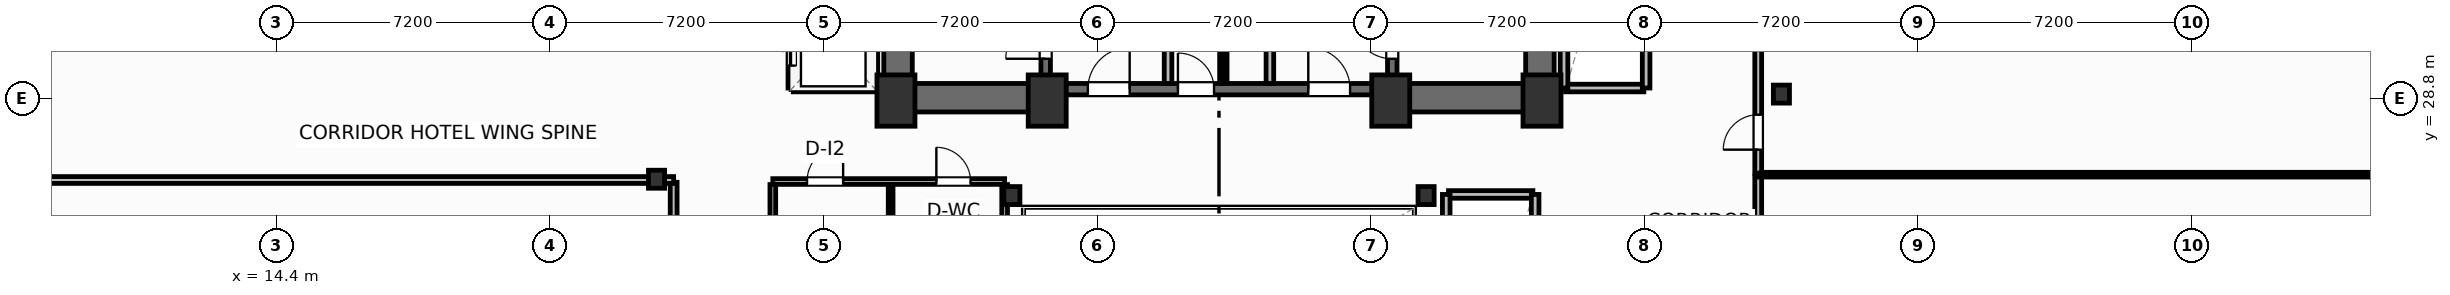
"""IFC4 building model, lengths in metres.
Left out: names, types, materials, properties, quantities, classifications, styles, units other than length and angle.
Written with IfcOpenShell. Run it as: python <this file> out.ifc"""

import sys

from ifc_helpers import new_model, si_unit, direction, frame, frame_2d, origin, origin_2d, place, context, subcontext, project, spatial, rectangle, i_section, extrude, element, fill, save


model = new_model("IFC4")
c1 = context("Model", 3, precision=1e-05, world=origin(), true_north=direction((0.0, 1.0)))
c2 = subcontext(c1, "Body", "Model", "MODEL_VIEW")
j1 = project(units=[si_unit("LENGTHUNIT", "METRE"), si_unit("PLANEANGLEUNIT", "RADIAN")], contexts=[c1])
p1 = place(None, origin())
s1 = spatial("IfcSite", under=j1, at=p1, CompositionType="ELEMENT")
p2 = place(p1, origin())
s2 = spatial("IfcBuilding", under=s1, at=p2, CompositionType="ELEMENT")
p3 = place(p2, frame((0.0, 0.0, 76.2)))
s3 = spatial("IfcBuildingStorey", under=s2, at=p3, CompositionType="ELEMENT", Elevation=76.2)
for number, where, z_axis, x_axis in (
    (1, (30.7, 28.75, 0.0), (0.0, 0.0, 1.0), (1.0, 0.0, 0.0)),
    (2, (34.68, 28.75, 0.0), (0.0, 0.0, 1.0), (1.0, 0.0, 0.0)),
    (3, (43.72, 28.75, 0.0), (0.0, 0.0, 1.0), (1.0, 0.0, 0.0)),
    (4, (47.7, 28.75, 0.0), (0.0, 0.0, 1.0), (1.0, 0.0, 0.0)),
):
    element("IfcColumn", number, at=place(p3, frame(where, z_axis=z_axis, x_axis=x_axis)), inside=s3, PredefinedType="COLUMN", context=c2, shape_type="SweptSolid", body=[
        extrude(rectangle(XDim=1.0, YDim=1.35, at=origin_2d()), origin(), (0.0, 0.0, 1.0), 3.7),
    ])
for number, where, z_axis, x_axis in (
    (5, (33.75, 26.25, 0.0), (0.0, 0.0, 1.0), (1.0, 0.0, 0.0)),
    (6, (44.65, 26.25, 0.0), (0.0, 0.0, 1.0), (1.0, 0.0, 0.0)),
    (7, (24.4, 26.68, 0.0), (0.0, 0.0, 1.0), (1.0, 0.0, 0.0)),
    (8, (54.0, 28.92, 0.0), (0.0, 0.0, 1.0), (1.0, 0.0, 0.0)),
):
    element("IfcColumn", number, at=place(p3, frame(where, z_axis=z_axis, x_axis=x_axis)), inside=s3, PredefinedType="COLUMN", context=c2, shape_type="SweptSolid", body=[
        extrude(i_section(OverallWidth=0.424, OverallDepth=0.474, WebThickness=0.048, FlangeThickness=0.077, FilletRadius=0.025, at=origin_2d()), origin(), (0.0, 0.0, 1.0), 3.7),
    ])
for number, where, z_axis, x_axis in (
    (9, (30.755, 29.2, 0.0), (0.0, 0.0, 1.0), (0.0, 1.0, 0.0)),
    (10, (47.645, 29.2, 0.0), (0.0, 0.0, 1.0), (0.0, 1.0, 0.0)),
):
    element("IfcWall", number, at=place(p3, frame(where, z_axis=z_axis, x_axis=x_axis)), inside=s3, PredefinedType="SHEAR", context=c2, shape_type="SweptSolid", body=[
        extrude(rectangle(XDim=9.22, YDim=0.75, at=frame_2d((4.61, 0.0))), origin(), (0.0, 0.0, 1.0), 3.45),
    ])
p4 = place(p3, frame((30.38, 28.825, 0.0), z_axis=(0.0, 0.0, 1.0), x_axis=(1.0, 0.0, 0.0)))
e11 = element("IfcWall", 11, at=p4, inside=s3, PredefinedType="SHEAR", context=c2, shape_type="SweptSolid", body=[
    extrude(rectangle(XDim=4.42, YDim=0.75, at=frame_2d((2.21, 0.0))), origin(), (0.0, 0.0, 1.0), 3.45),
])
p5 = place(p3, frame((43.6, 28.825, 0.0), z_axis=(0.0, 0.0, 1.0), x_axis=(1.0, 0.0, 0.0)))
e12 = element("IfcWall", 12, at=p5, inside=s3, PredefinedType="SHEAR", context=c2, shape_type="SweptSolid", body=[
    extrude(rectangle(XDim=4.42, YDim=0.75, at=frame_2d((2.21, 0.0))), origin(), (0.0, 0.0, 1.0), 3.45),
])
p6 = place(p3, frame((34.8, 29.05, 0.0), z_axis=(0.0, 0.0, 1.0), x_axis=(1.0, 0.0, 0.0)))
e13 = element("IfcWall", 13, at=p6, inside=s3, PredefinedType="SHEAR", context=c2, shape_type="SweptSolid", body=[
    extrude(rectangle(XDim=8.8, YDim=0.3, at=frame_2d((4.4, 0.0))), origin(), (0.0, 0.0, 1.0), 3.45),
])
p7 = place(p6, frame((0.95, 0.0, 0.0)))
e14 = element("IfcOpeningElement", 14, at=p7, cuts=e13, PredefinedType="OPENING", context=c2, shape_type="SweptSolid", body=[
    extrude(rectangle(XDim=1.1, YDim=2.15, at=frame_2d((0.55, 1.075))), frame((0.0, 0.16, 0.0), z_axis=(0.0, -1.0, 0.0), x_axis=(1.0, 0.0, 0.0)), (0.0, 0.0, 1.0), 0.32),
])
p8 = place(p6, frame((6.75, 0.0, 0.0)))
e15 = element("IfcOpeningElement", 15, at=p8, cuts=e13, PredefinedType="OPENING", context=c2, shape_type="SweptSolid", body=[
    extrude(rectangle(XDim=1.1, YDim=2.15, at=frame_2d((0.55, 1.075))), frame((0.0, 0.16, 0.0), z_axis=(0.0, -1.0, 0.0), x_axis=(1.0, 0.0, 0.0)), (0.0, 0.0, 1.0), 0.32),
])
p9 = place(p6, frame((3.32, 0.0, 0.0)))
e16 = element("IfcOpeningElement", 16, at=p9, cuts=e13, PredefinedType="OPENING", context=c2, shape_type="SweptSolid", body=[
    extrude(rectangle(XDim=0.95, YDim=2.15, at=frame_2d((0.475, 1.075))), frame((0.0, 0.16, 0.0), z_axis=(0.0, -1.0, 0.0), x_axis=(1.0, 0.0, 0.0)), (0.0, 0.0, 1.0), 0.32),
])
p10 = place(p3, frame((34.64, 29.2, 0.0), z_axis=(0.0, 0.0, 1.0), x_axis=(0.0, 1.0, 0.0)))
e17 = element("IfcWall", 17, at=p10, inside=s3, PredefinedType="SHEAR", context=c2, shape_type="SweptSolid", body=[
    extrude(rectangle(XDim=9.22, YDim=0.25, at=frame_2d((4.61, 0.0))), origin(), (0.0, 0.0, 1.0), 3.45),
])
p11 = place(p10, frame((0.65, 0.0, 0.0)))
e18 = element("IfcOpeningElement", 18, at=p11, cuts=e17, PredefinedType="OPENING", context=c2, shape_type="SweptSolid", body=[
    extrude(rectangle(XDim=1.05, YDim=2.15, at=frame_2d((0.525, 1.075))), frame((0.0, 0.135, 0.0), z_axis=(0.0, -1.0, 0.0), x_axis=(1.0, 0.0, 0.0)), (0.0, 0.0, 1.0), 0.27),
])
p12 = place(p3, frame((43.76, 29.2, 0.0), z_axis=(0.0, 0.0, 1.0), x_axis=(0.0, 1.0, 0.0)))
e19 = element("IfcWall", 19, at=p12, inside=s3, PredefinedType="SHEAR", context=c2, shape_type="SweptSolid", body=[
    extrude(rectangle(XDim=9.22, YDim=0.25, at=frame_2d((4.61, 0.0))), origin(), (0.0, 0.0, 1.0), 3.45),
])
p13 = place(p12, frame((0.65, 0.0, 0.0)))
e20 = element("IfcOpeningElement", 20, at=p13, cuts=e19, PredefinedType="OPENING", context=c2, shape_type="SweptSolid", body=[
    extrude(rectangle(XDim=1.05, YDim=2.15, at=frame_2d((0.525, 1.075))), frame((0.0, 0.135, 0.0), z_axis=(0.0, -1.0, 0.0), x_axis=(1.0, 0.0, 0.0)), (0.0, 0.0, 1.0), 0.27),
])
p14 = place(p3, frame((24.85, 23.03, 0.0), z_axis=(0.0, 0.0, 1.0), x_axis=(0.0, 1.0, 0.0)))
e21 = element("IfcWall", 21, at=p14, inside=s3, PredefinedType="PARTITIONING", context=c2, shape_type="SweptSolid", body=[
    extrude(rectangle(XDim=3.57, YDim=0.18, at=frame_2d((1.785, 0.0))), origin(), (0.0, 0.0, 1.0), 3.45),
])
p15 = place(p14, frame((1.5, 0.0, 0.0)))
e22 = element("IfcOpeningElement", 22, at=p15, cuts=e21, PredefinedType="OPENING", context=c2, shape_type="SweptSolid", body=[
    extrude(rectangle(XDim=0.92, YDim=2.05, at=frame_2d((0.46, 1.025))), frame((0.0, 0.1, 0.0), z_axis=(0.0, -1.0, 0.0), x_axis=(1.0, 0.0, 0.0)), (0.0, 0.0, 1.0), 0.2),
])
p16 = place(p3, frame((-0.086, 26.66, 0.0), z_axis=(0.0, 0.0, 1.0), x_axis=(1.0, 0.0, 0.0)))
e23 = element("IfcWall", 23, at=p16, inside=s3, PredefinedType="PARTITIONING", context=c2, shape_type="SweptSolid", body=[
    extrude(rectangle(XDim=24.936, YDim=0.18, at=frame_2d((12.468, 0.0))), origin(), (0.0, 0.0, 1.0), 2.662),
])
p17 = place(p3, frame((53.39, 19.24, 0.0), z_axis=(0.0, 0.0, 1.0), x_axis=(0.0, 1.0, 0.0)))
e24 = element("IfcWall", 24, at=p17, inside=s3, PredefinedType="PARTITIONING", context=c2, shape_type="SweptSolid", body=[
    extrude(rectangle(XDim=7.52, YDim=0.18, at=frame_2d((3.76, 0.0))), origin(), (0.0, 0.0, 1.0), 3.45),
])
p18 = place(p17, frame((2.1, 0.0, 0.0)))
e25 = element("IfcOpeningElement", 25, at=p18, cuts=e24, PredefinedType="OPENING", context=c2, shape_type="SweptSolid", body=[
    extrude(rectangle(XDim=0.92, YDim=2.05, at=frame_2d((0.46, 1.025))), frame((0.0, 0.1, 0.0), z_axis=(0.0, -1.0, 0.0), x_axis=(1.0, 0.0, 0.0)), (0.0, 0.0, 1.0), 0.2),
])
p19 = place(p3, frame((53.39, 26.8, 0.0), z_axis=(0.0, 0.0, 1.0), x_axis=(1.0, 0.0, 0.0)))
e26 = element("IfcWall", 26, at=p19, inside=s3, PredefinedType="PARTITIONING", context=c2, shape_type="SweptSolid", body=[
    extrude(rectangle(XDim=23.61, YDim=0.125, at=frame_2d((11.805, 0.0))), origin(), (0.0, 0.0, 1.0), 3.45),
])
p20 = place(p3, frame((53.39, 26.84, 0.0), z_axis=(0.0, 0.0, 1.0), x_axis=(0.0, 1.0, 0.0)))
e27 = element("IfcWall", 27, at=p20, inside=s3, PredefinedType="PARTITIONING", context=c2, shape_type="SweptSolid", body=[
    extrude(rectangle(XDim=12.46, YDim=0.18, at=frame_2d((6.23, 0.0))), origin(), (0.0, 0.0, 1.0), 3.45),
])
p21 = place(p20, frame((0.618, 0.0, 0.0)))
e28 = element("IfcOpeningElement", 28, at=p21, cuts=e27, PredefinedType="OPENING", context=c2, shape_type="SweptSolid", body=[
    extrude(rectangle(XDim=0.92, YDim=2.05, at=frame_2d((0.46, 1.025))), frame((0.0, 0.1, 0.0), z_axis=(0.0, -1.0, 0.0), x_axis=(1.0, 0.0, 0.0)), (0.0, 0.0, 1.0), 0.2),
])
for number, where, z_axis, x_axis in (
    (29, (37.86, 29.2, 0.0), (0.0, 0.0, 1.0), (0.0, 1.0, 0.0)),
    (30, (40.54, 29.2, 0.0), (0.0, 0.0, 1.0), (0.0, 1.0, 0.0)),
):
    element("IfcWall", number, at=place(p3, frame(where, z_axis=z_axis, x_axis=x_axis)), inside=s3, PredefinedType="PARTITIONING", context=c2, shape_type="SweptSolid", body=[
        extrude(rectangle(XDim=5.18, YDim=0.2, at=frame_2d((2.59, 0.0))), origin(), (0.0, 0.0, 1.0), 3.45),
    ])
p22 = place(p3, frame((39.35, 29.2, 0.0), z_axis=(0.0, 0.0, 1.0), x_axis=(0.0, 1.0, 0.0)))
e31 = element("IfcWall", 31, at=p22, inside=s3, PredefinedType="PARTITIONING", context=c2, shape_type="SweptSolid", body=[
    extrude(rectangle(XDim=5.22, YDim=0.125, at=frame_2d((2.61, 0.0))), origin(), (0.0, 0.0, 1.0), 3.45),
])
p23 = place(p22, frame((2.05, 0.0, 0.0)))
e32 = element("IfcOpeningElement", 32, at=p23, cuts=e31, PredefinedType="OPENING", context=c2, shape_type="SweptSolid", body=[
    extrude(rectangle(XDim=0.85, YDim=2.05, at=frame_2d((0.425, 1.025))), frame((0.0, 0.073, 0.0), z_axis=(0.0, -1.0, 0.0), x_axis=(1.0, 0.0, 0.0)), (0.0, 0.0, 1.0), 0.145),
])
p24 = place(p3, frame((27.46, 26.62, 0.0), z_axis=(0.0, 0.0, 1.0), x_axis=(1.0, 0.0, 0.0)))
e33 = element("IfcWall", 33, at=p24, inside=s3, PredefinedType="PARTITIONING", context=c2, shape_type="SweptSolid", body=[
    extrude(rectangle(XDim=6.1, YDim=0.15, at=frame_2d((3.05, 0.0))), origin(), (0.0, 0.0, 1.0), 2.662),
])
p25 = place(p24, frame((0.9, 0.0, 0.0)))
e34 = element("IfcOpeningElement", 34, at=p25, cuts=e33, PredefinedType="OPENING", context=c2, shape_type="SweptSolid", body=[
    extrude(rectangle(XDim=0.95, YDim=2.05, at=frame_2d((0.475, 1.025))), frame((0.0, 0.085, 0.0), z_axis=(0.0, -1.0, 0.0), x_axis=(1.0, 0.0, 0.0)), (0.0, 0.0, 1.0), 0.17),
])
p26 = place(p24, frame((4.303, 0.0, 0.0)))
e35 = element("IfcOpeningElement", 35, at=p26, cuts=e33, PredefinedType="OPENING", context=c2, shape_type="SweptSolid", body=[
    extrude(rectangle(XDim=0.9, YDim=2.05, at=frame_2d((0.45, 1.025))), frame((0.0, 0.085, 0.0), z_axis=(0.0, -1.0, 0.0), x_axis=(1.0, 0.0, 0.0)), (0.0, 0.0, 1.0), 0.17),
])
p27 = place(p3, frame((30.56, 19.38, 0.0), z_axis=(0.0, 0.0, 1.0), x_axis=(0.0, 1.0, 0.0)))
e36 = element("IfcWall", 36, at=p27, inside=s3, PredefinedType="PARTITIONING", context=c2, shape_type="SweptSolid", body=[
    extrude(rectangle(XDim=7.16, YDim=0.125, at=frame_2d((3.58, 0.0))), origin(), (0.0, 0.0, 1.0), 3.45),
])
p28 = place(p27, frame((1.4, 0.0, 0.0)))
e37 = element("IfcOpeningElement", 37, at=p28, cuts=e36, PredefinedType="OPENING", context=c2, shape_type="SweptSolid", body=[
    extrude(rectangle(XDim=0.92, YDim=2.05, at=frame_2d((0.46, 1.025))), frame((0.0, 0.073, 0.0), z_axis=(0.0, -1.0, 0.0), x_axis=(1.0, 0.0, 0.0)), (0.0, 0.0, 1.0), 0.145),
])
p29 = place(p3, frame((27.46, 19.38, 0.0), z_axis=(0.0, 0.0, 1.0), x_axis=(0.0, 1.0, 0.0)))
e38 = element("IfcWall", 38, at=p29, inside=s3, PredefinedType="PARTITIONING", context=c2, shape_type="SweptSolid", body=[
    extrude(rectangle(XDim=7.16, YDim=0.15, at=frame_2d((3.58, 0.0))), origin(), (0.0, 0.0, 1.0), 3.45),
])
p30 = place(p3, frame((33.56, 19.38, 0.0), z_axis=(0.0, 0.0, 1.0), x_axis=(0.0, 1.0, 0.0)))
e39 = element("IfcWall", 39, at=p30, inside=s3, PredefinedType="PARTITIONING", context=c2, shape_type="SweptSolid", body=[
    extrude(rectangle(XDim=7.16, YDim=0.15, at=frame_2d((3.58, 0.0))), origin(), (0.0, 0.0, 1.0), 2.824),
])
p31 = place(p3, frame((28.0, 29.08, 0.0), z_axis=(0.0, 0.0, 1.0), x_axis=(1.0, 0.0, 0.0)))
e40 = element("IfcWall", 40, at=p31, inside=s3, PredefinedType="PARTITIONING", context=c2, shape_type="SweptSolid", body=[
    extrude(rectangle(XDim=2.1, YDim=0.2, at=frame_2d((1.05, 0.0))), origin(), (0.0, 0.0, 1.0), 3.45),
])
p32 = place(p3, frame((30.12, 29.08, 0.0), z_axis=(0.0, 0.0, 1.0), x_axis=(0.0, 1.0, 0.0)))
e41 = element("IfcWall", 41, at=p32, inside=s3, PredefinedType="PARTITIONING", context=c2, shape_type="SweptSolid", body=[
    extrude(rectangle(XDim=6.89, YDim=0.2, at=frame_2d((3.445, 0.0))), origin(), (0.0, 0.0, 1.0), 3.45),
])
p33 = place(p3, frame((27.96, 29.08, 0.0), z_axis=(0.0, 0.0, 1.0), x_axis=(0.0, 1.0, 0.0)))
e42 = element("IfcWall", 42, at=p33, inside=s3, PredefinedType="PARTITIONING", context=c2, shape_type="SweptSolid", body=[
    extrude(rectangle(XDim=6.89, YDim=0.2, at=frame_2d((3.445, 0.0))), origin(), (0.0, 0.0, 1.0), 3.45),
])
p34 = place(p33, frame((0.59, 0.0, 0.0)))
e43 = element("IfcOpeningElement", 43, at=p34, cuts=e42, PredefinedType="OPENING", context=c2, shape_type="SweptSolid", body=[
    extrude(rectangle(XDim=1.1, YDim=2.15, at=frame_2d((0.55, 1.075))), frame((0.0, 0.11, 0.0), z_axis=(0.0, -1.0, 0.0), x_axis=(1.0, 0.0, 0.0)), (0.0, 0.0, 1.0), 0.22),
])
p35 = place(p33, frame((2.89, 0.0, 0.0)))
e44 = element("IfcOpeningElement", 44, at=p35, cuts=e42, PredefinedType="OPENING", context=c2, shape_type="SweptSolid", body=[
    extrude(rectangle(XDim=1.1, YDim=2.15, at=frame_2d((0.55, 1.075))), frame((0.0, 0.11, 0.0), z_axis=(0.0, -1.0, 0.0), x_axis=(1.0, 0.0, 0.0)), (0.0, 0.0, 1.0), 0.22),
])
p36 = place(p33, frame((5.19, 0.0, 0.0)))
e45 = element("IfcOpeningElement", 45, at=p36, cuts=e42, PredefinedType="OPENING", context=c2, shape_type="SweptSolid", body=[
    extrude(rectangle(XDim=1.1, YDim=2.15, at=frame_2d((0.55, 1.075))), frame((0.0, 0.11, 0.0), z_axis=(0.0, -1.0, 0.0), x_axis=(1.0, 0.0, 0.0)), (0.0, 0.0, 1.0), 0.22),
])
p37 = place(p3, frame((48.32, 29.08, 0.0), z_axis=(0.0, 0.0, 1.0), x_axis=(1.0, 0.0, 0.0)))
e46 = element("IfcWall", 46, at=p37, inside=s3, PredefinedType="PARTITIONING", context=c2, shape_type="SweptSolid", body=[
    extrude(rectangle(XDim=2.06, YDim=0.2, at=frame_2d((1.03, 0.0))), origin(), (0.0, 0.0, 1.0), 2.662),
])
for number, where, z_axis, x_axis in (
    (47, (48.28, 29.08, 0.0), (0.0, 0.0, 1.0), (0.0, 1.0, 0.0)),
    (48, (50.44, 29.08, 0.0), (0.0, 0.0, 1.0), (0.0, 1.0, 0.0)),
):
    element("IfcWall", number, at=place(p3, frame(where, z_axis=z_axis, x_axis=x_axis)), inside=s3, PredefinedType="PARTITIONING", context=c2, shape_type="SweptSolid", body=[
        extrude(rectangle(XDim=6.89, YDim=0.2, at=frame_2d((3.445, 0.0))), origin(), (0.0, 0.0, 1.0), 3.45),
    ])
p38 = place(p3, frame((45.24, 26.28, 0.0), z_axis=(0.0, 0.0, 1.0), x_axis=(1.0, 0.0, 0.0)))
e49 = element("IfcWall", 49, at=p38, inside=s3, PredefinedType="PARTITIONING", context=c2, shape_type="SweptSolid", body=[
    extrude(rectangle(XDim=2.22, YDim=0.2, at=frame_2d((1.11, 0.0))), origin(), (0.0, 0.0, 1.0), 3.45),
])
for number, where, z_axis, x_axis in (
    (50, (45.18, 19.38, 0.0), (0.0, 0.0, 1.0), (0.0, 1.0, 0.0)),
    (51, (47.52, 19.38, 0.0), (0.0, 0.0, 1.0), (0.0, 1.0, 0.0)),
):
    element("IfcWall", number, at=place(p3, frame(where, z_axis=z_axis, x_axis=x_axis)), inside=s3, PredefinedType="PARTITIONING", context=c2, shape_type="SweptSolid", body=[
        extrude(rectangle(XDim=6.9, YDim=0.2, at=frame_2d((3.45, 0.0))), origin(), (0.0, 0.0, 1.0), 3.45),
    ])
p39 = place(p21, origin())
e52 = element("IfcDoor", 52, at=p39, inside=s3, OperationType="SINGLE_SWING_LEFT", PredefinedType="DOOR", context=c2, shape_type="SweptSolid", body=[
    extrude(rectangle(XDim=0.92, YDim=2.05, at=frame_2d((0.46, 1.025))), frame((0.0, 0.025, 0.0), z_axis=(0.0, -1.0, 0.0), x_axis=(1.0, 0.0, 0.0)), (0.0, 0.0, 1.0), 0.05),
])
fill(e28, e52)
p40 = place(p11, origin())
e53 = element("IfcDoor", 53, at=p40, inside=s3, OperationType="SINGLE_SWING_LEFT", PredefinedType="DOOR", context=c2, shape_type="SweptSolid", body=[
    extrude(rectangle(XDim=1.05, YDim=2.15, at=frame_2d((0.525, 1.075))), frame((0.0, 0.025, 0.0), z_axis=(0.0, -1.0, 0.0), x_axis=(1.0, 0.0, 0.0)), (0.0, 0.0, 1.0), 0.05),
])
fill(e18, e53)
p41 = place(p13, origin())
e54 = element("IfcDoor", 54, at=p41, inside=s3, OperationType="SINGLE_SWING_RIGHT", PredefinedType="DOOR", context=c2, shape_type="SweptSolid", body=[
    extrude(rectangle(XDim=1.05, YDim=2.15, at=frame_2d((0.525, 1.075))), frame((0.0, 0.025, 0.0), z_axis=(0.0, -1.0, 0.0), x_axis=(1.0, 0.0, 0.0)), (0.0, 0.0, 1.0), 0.05),
])
fill(e20, e54)
p42 = place(p7, origin())
e55 = element("IfcDoor", 55, at=p42, inside=s3, OperationType="SINGLE_SWING_RIGHT", PredefinedType="DOOR", context=c2, shape_type="SweptSolid", body=[
    extrude(rectangle(XDim=1.1, YDim=2.15, at=frame_2d((0.55, 1.075))), frame((0.0, 0.025, 0.0), z_axis=(0.0, -1.0, 0.0), x_axis=(1.0, 0.0, 0.0)), (0.0, 0.0, 1.0), 0.05),
])
fill(e14, e55)
p43 = place(p8, origin())
e56 = element("IfcDoor", 56, at=p43, inside=s3, OperationType="SINGLE_SWING_LEFT", PredefinedType="DOOR", context=c2, shape_type="SweptSolid", body=[
    extrude(rectangle(XDim=1.1, YDim=2.15, at=frame_2d((0.55, 1.075))), frame((0.0, 0.025, 0.0), z_axis=(0.0, -1.0, 0.0), x_axis=(1.0, 0.0, 0.0)), (0.0, 0.0, 1.0), 0.05),
])
fill(e15, e56)
p44 = place(p9, origin())
e57 = element("IfcDoor", 57, at=p44, inside=s3, OperationType="SINGLE_SWING_LEFT", PredefinedType="DOOR", context=c2, shape_type="SweptSolid", body=[
    extrude(rectangle(XDim=0.95, YDim=2.15, at=frame_2d((0.475, 1.075))), frame((0.0, 0.025, 0.0), z_axis=(0.0, -1.0, 0.0), x_axis=(1.0, 0.0, 0.0)), (0.0, 0.0, 1.0), 0.05),
])
fill(e16, e57)
p45 = place(p25, origin())
e58 = element("IfcDoor", 58, at=p45, inside=s3, OperationType="SINGLE_SWING_RIGHT", PredefinedType="DOOR", context=c2, shape_type="SweptSolid", body=[
    extrude(rectangle(XDim=0.95, YDim=2.05, at=frame_2d((0.475, 1.025))), frame((0.0, 0.025, 0.0), z_axis=(0.0, -1.0, 0.0), x_axis=(1.0, 0.0, 0.0)), (0.0, 0.0, 1.0), 0.05),
])
fill(e34, e58)
p46 = place(p26, origin())
e59 = element("IfcDoor", 59, at=p46, inside=s3, OperationType="SINGLE_SWING_LEFT", PredefinedType="DOOR", context=c2, shape_type="SweptSolid", body=[
    extrude(rectangle(XDim=0.9, YDim=2.05, at=frame_2d((0.45, 1.025))), frame((0.0, 0.025, 0.0), z_axis=(0.0, -1.0, 0.0), x_axis=(1.0, 0.0, 0.0)), (0.0, 0.0, 1.0), 0.05),
])
fill(e35, e59)
p47 = place(p34, origin())
e60 = element("IfcDoor", 60, at=p47, inside=s3, OperationType="SLIDING_TO_LEFT", PredefinedType="DOOR", context=c2, shape_type="SweptSolid", body=[
    extrude(rectangle(XDim=1.1, YDim=2.15, at=frame_2d((0.55, 1.075))), frame((0.0, 0.025, 0.0), z_axis=(0.0, -1.0, 0.0), x_axis=(1.0, 0.0, 0.0)), (0.0, 0.0, 1.0), 0.05),
])
fill(e43, e60)
save(model, sys.argv[1])
